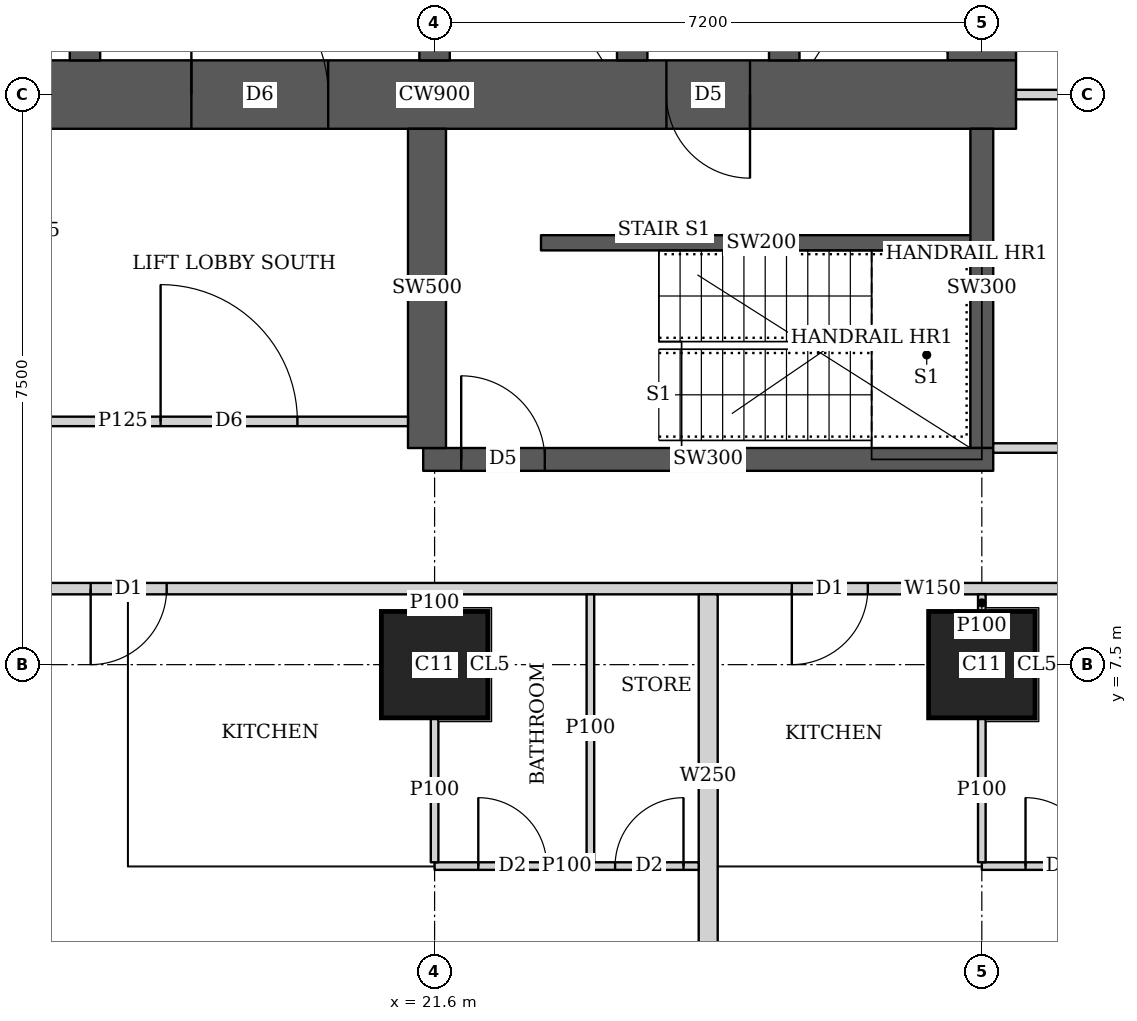
"""IFC4 building model, lengths in metres.
Left out: names, types, materials, properties, quantities, classifications, styles, units other than length and angle.
Written with IfcOpenShell. Run it as: python <this file> out.ifc"""

import sys

from ifc_helpers import new_model, si_unit, direction, frame, frame_2d, origin, origin_2d, place, context, subcontext, project, spatial, rectangle, extrude, element, fill, save


model = new_model("IFC4")
c1 = context("Model", 3, precision=1e-05, world=origin(), true_north=direction((0.0, 1.0)))
c2 = subcontext(c1, "Body", "Model", "MODEL_VIEW")
j1 = project(units=[si_unit("LENGTHUNIT", "METRE"), si_unit("PLANEANGLEUNIT", "RADIAN")], contexts=[c1])
p1 = place(None, origin())
s1 = spatial("IfcSite", under=j1, at=p1, CompositionType="ELEMENT")
p2 = place(p1, origin())
s2 = spatial("IfcBuilding", under=s1, at=p2, CompositionType="ELEMENT")
p3 = place(p2, frame((0.0, 0.0, 223.7)))
s3 = spatial("IfcBuildingStorey", under=s2, at=p3, CompositionType="ELEMENT", Elevation=223.7)
for number, where, z_axis, x_axis in (
    (1, (21.6, 7.5, 0.0), (0.0, 0.0, 1.0), (1.0, 0.0, 0.0)),
    (2, (28.8, 7.5, 0.0), (0.0, 0.0, 1.0), (1.0, 0.0, 0.0)),
):
    element("IfcColumn", number, at=place(p3, frame(where, z_axis=z_axis, x_axis=x_axis)), inside=s3, PredefinedType="COLUMN", context=c2, shape_type="SweptSolid", body=[
        extrude(rectangle(XDim=1.4, YDim=1.4, at=origin_2d()), origin(), (0.0, 0.0, 1.0), 3.75),
    ])
p4 = place(p3, frame((13.95, 15.0, 0.0), z_axis=(0.0, 0.0, 1.0), x_axis=(1.0, 0.0, 0.0)))
e3 = element("IfcWall", 3, at=p4, inside=s3, PredefinedType="SHEAR", context=c2, shape_type="SweptSolid", body=[
    extrude(rectangle(XDim=15.3, YDim=0.9, at=frame_2d((7.65, 0.0))), origin(), (0.0, 0.0, 1.0), 3.75),
])
p5 = place(p4, frame((4.45, 0.0, 0.0)))
e4 = element("IfcOpeningElement", 4, at=p5, cuts=e3, PredefinedType="OPENING", context=c2, shape_type="SweptSolid", body=[
    extrude(rectangle(XDim=1.8, YDim=2.1, at=frame_2d((0.9, 1.05))), frame((0.0, 0.46, 0.0), z_axis=(0.0, -1.0, 0.0), x_axis=(1.0, 0.0, 0.0)), (0.0, 0.0, 1.0), 0.92),
])
p6 = place(p4, frame((10.7, 0.0, 0.0)))
e5 = element("IfcOpeningElement", 5, at=p6, cuts=e3, PredefinedType="OPENING", context=c2, shape_type="SweptSolid", body=[
    extrude(rectangle(XDim=1.1, YDim=2.1, at=frame_2d((0.55, 1.05))), frame((0.0, 0.46, 0.0), z_axis=(0.0, -1.0, 0.0), x_axis=(1.0, 0.0, 0.0)), (0.0, 0.0, 1.0), 0.92),
])
p7 = place(p3, frame((28.8, 15.45, 0.0), z_axis=(0.0, 0.0, 1.0), x_axis=(0.0, 1.0, 0.0)))
e6 = element("IfcWall", 6, at=p7, inside=s3, PredefinedType="SHEAR", context=c2, shape_type="SweptSolid", body=[
    extrude(rectangle(XDim=14.1, YDim=0.9, at=frame_2d((7.05, 0.0))), origin(), (0.0, 0.0, 1.0), 3.75),
])
p8 = place(p3, frame((17.0, 15.45, 0.0), z_axis=(0.0, 0.0, 1.0), x_axis=(0.0, 1.0, 0.0)))
e7 = element("IfcWall", 7, at=p8, inside=s3, PredefinedType="SHEAR", context=c2, shape_type="SweptSolid", body=[
    extrude(rectangle(XDim=14.1, YDim=0.4, at=frame_2d((7.05, 0.0))), origin(), (0.0, 0.0, 1.0), 3.75),
])
p9 = place(p8, frame((1.05, 0.0, 0.0)))
e8 = element("IfcOpeningElement", 8, at=p9, cuts=e7, PredefinedType="OPENING", context=c2, shape_type="SweptSolid", body=[
    extrude(rectangle(XDim=1.0, YDim=2.1, at=frame_2d((0.5, 1.05))), frame((0.0, 0.21, 0.0), z_axis=(0.0, -1.0, 0.0), x_axis=(1.0, 0.0, 0.0)), (0.0, 0.0, 1.0), 0.42),
])
p10 = place(p8, frame((4.675, 0.0, 0.0)))
e9 = element("IfcOpeningElement", 9, at=p10, cuts=e7, PredefinedType="OPENING", context=c2, shape_type="SweptSolid", body=[
    extrude(rectangle(XDim=1.0, YDim=2.1, at=frame_2d((0.5, 1.05))), frame((0.0, 0.21, 0.0), z_axis=(0.0, -1.0, 0.0), x_axis=(1.0, 0.0, 0.0)), (0.0, 0.0, 1.0), 0.42),
])
p11 = place(p8, frame((8.425, 0.0, 0.0)))
e10 = element("IfcOpeningElement", 10, at=p11, cuts=e7, PredefinedType="OPENING", context=c2, shape_type="SweptSolid", body=[
    extrude(rectangle(XDim=1.0, YDim=2.1, at=frame_2d((0.5, 1.05))), frame((0.0, 0.21, 0.0), z_axis=(0.0, -1.0, 0.0), x_axis=(1.0, 0.0, 0.0)), (0.0, 0.0, 1.0), 0.42),
])
p12 = place(p8, frame((12.175, 0.0, 0.0)))
e11 = element("IfcOpeningElement", 11, at=p12, cuts=e7, PredefinedType="OPENING", context=c2, shape_type="SweptSolid", body=[
    extrude(rectangle(XDim=1.0, YDim=2.1, at=frame_2d((0.5, 1.05))), frame((0.0, 0.21, 0.0), z_axis=(0.0, -1.0, 0.0), x_axis=(1.0, 0.0, 0.0)), (0.0, 0.0, 1.0), 0.42),
])
p13 = place(p3, frame((21.6, 15.45, 0.0), z_axis=(0.0, 0.0, 1.0), x_axis=(0.0, 1.0, 0.0)))
e12 = element("IfcWall", 12, at=p13, inside=s3, PredefinedType="SHEAR", context=c2, shape_type="SweptSolid", body=[
    extrude(rectangle(XDim=14.1, YDim=0.4, at=frame_2d((7.05, 0.0))), origin(), (0.0, 0.0, 1.0), 3.75),
])
p14 = place(p13, frame((0.875, 0.0, 0.0)))
e13 = element("IfcOpeningElement", 13, at=p14, cuts=e12, PredefinedType="OPENING", context=c2, shape_type="SweptSolid", body=[
    extrude(rectangle(XDim=1.1, YDim=2.1, at=frame_2d((0.55, 1.05))), frame((0.0, 0.21, 0.0), z_axis=(0.0, -1.0, 0.0), x_axis=(1.0, 0.0, 0.0)), (0.0, 0.0, 1.0), 0.42),
])
p15 = place(p13, frame((4.625, 0.0, 0.0)))
e14 = element("IfcOpeningElement", 14, at=p15, cuts=e12, PredefinedType="OPENING", context=c2, shape_type="SweptSolid", body=[
    extrude(rectangle(XDim=1.1, YDim=2.1, at=frame_2d((0.55, 1.05))), frame((0.0, 0.21, 0.0), z_axis=(0.0, -1.0, 0.0), x_axis=(1.0, 0.0, 0.0)), (0.0, 0.0, 1.0), 0.42),
])
p16 = place(p13, frame((8.375, 0.0, 0.0)))
e15 = element("IfcOpeningElement", 15, at=p16, cuts=e12, PredefinedType="OPENING", context=c2, shape_type="SweptSolid", body=[
    extrude(rectangle(XDim=1.1, YDim=2.1, at=frame_2d((0.55, 1.05))), frame((0.0, 0.21, 0.0), z_axis=(0.0, -1.0, 0.0), x_axis=(1.0, 0.0, 0.0)), (0.0, 0.0, 1.0), 0.42),
])
p17 = place(p13, frame((12.125, 0.0, 0.0)))
e16 = element("IfcOpeningElement", 16, at=p17, cuts=e12, PredefinedType="OPENING", context=c2, shape_type="SweptSolid", body=[
    extrude(rectangle(XDim=1.1, YDim=2.1, at=frame_2d((0.55, 1.05))), frame((0.0, 0.21, 0.0), z_axis=(0.0, -1.0, 0.0), x_axis=(1.0, 0.0, 0.0)), (0.0, 0.0, 1.0), 0.42),
])
p18 = place(p3, frame((24.2, 15.45, 0.0), z_axis=(0.0, 0.0, 1.0), x_axis=(0.0, 1.0, 0.0)))
e17 = element("IfcWall", 17, at=p18, inside=s3, PredefinedType="SHEAR", context=c2, shape_type="SweptSolid", body=[
    extrude(rectangle(XDim=14.1, YDim=0.4, at=frame_2d((7.05, 0.0))), origin(), (0.0, 0.0, 1.0), 3.75),
])
p19 = place(p3, frame((26.2, 15.45, 0.0), z_axis=(0.0, 0.0, 1.0), x_axis=(0.0, 1.0, 0.0)))
e18 = element("IfcWall", 18, at=p19, inside=s3, PredefinedType="SHEAR", context=c2, shape_type="SweptSolid", body=[
    extrude(rectangle(XDim=3.1, YDim=0.4, at=frame_2d((1.55, 0.0))), origin(), (0.0, 0.0, 1.0), 3.75),
])
p20 = place(p19, frame((0.825, 0.0, 0.0)))
e19 = element("IfcOpeningElement", 19, at=p20, cuts=e18, PredefinedType="OPENING", context=c2, shape_type="SweptSolid", body=[
    extrude(rectangle(XDim=1.2, YDim=2.1, at=frame_2d((0.6, 1.05))), frame((0.0, 0.21, 0.0), z_axis=(0.0, -1.0, 0.0), x_axis=(1.0, 0.0, 0.0)), (0.0, 0.0, 1.0), 0.42),
])
p21 = place(p3, frame((21.45, 10.2, 0.0), z_axis=(0.0, 0.0, 1.0), x_axis=(1.0, 0.0, 0.0)))
e20 = element("IfcWall", 20, at=p21, inside=s3, PredefinedType="SHEAR", context=c2, shape_type="SweptSolid", body=[
    extrude(rectangle(XDim=7.5, YDim=0.3, at=frame_2d((3.75, 0.0))), origin(), (0.0, 0.0, 1.0), 3.75),
])
p22 = place(p21, frame((0.5, 0.0, 0.0)))
e21 = element("IfcOpeningElement", 21, at=p22, cuts=e20, PredefinedType="OPENING", context=c2, shape_type="SweptSolid", body=[
    extrude(rectangle(XDim=1.1, YDim=2.1, at=frame_2d((0.55, 1.05))), frame((0.0, 0.16, 0.0), z_axis=(0.0, -1.0, 0.0), x_axis=(1.0, 0.0, 0.0)), (0.0, 0.0, 1.0), 0.32),
])
p23 = place(p3, frame((21.5, 10.35, 0.0), z_axis=(0.0, 0.0, 1.0), x_axis=(0.0, 1.0, 0.0)))
e22 = element("IfcWall", 22, at=p23, inside=s3, PredefinedType="SHEAR", context=c2, shape_type="SweptSolid", body=[
    extrude(rectangle(XDim=4.2, YDim=0.5, at=frame_2d((2.1, 0.0))), origin(), (0.0, 0.0, 1.0), 3.75),
])
p24 = place(p3, frame((28.8, 10.35, 0.0), z_axis=(0.0, 0.0, 1.0), x_axis=(0.0, 1.0, 0.0)))
e23 = element("IfcWall", 23, at=p24, inside=s3, PredefinedType="SHEAR", context=c2, shape_type="SweptSolid", body=[
    extrude(rectangle(XDim=4.2, YDim=0.3, at=frame_2d((2.1, 0.0))), origin(), (0.0, 0.0, 1.0), 3.75),
])
p25 = place(p3, frame((40.053, 8.5, 0.0), z_axis=(0.0, 0.0, 1.0), x_axis=(-1.0, 0.0, 0.0)))
e24 = element("IfcWall", 24, at=p25, inside=s3, PredefinedType="SOLIDWALL", context=c2, shape_type="SweptSolid", body=[
    extrude(rectangle(XDim=23.798, YDim=0.15, at=frame_2d((11.899, 0.0))), origin(), (0.0, 0.0, 1.0), 3.5),
])
p26 = place(p25, frame((21.978, 0.0, 0.0)))
e25 = element("IfcOpeningElement", 25, at=p26, cuts=e24, PredefinedType="OPENING", context=c2, shape_type="SweptSolid", body=[
    extrude(rectangle(XDim=1.0, YDim=2.1, at=frame_2d((0.5, 1.05))), frame((0.0, 0.085, 0.0), z_axis=(0.0, -1.0, 0.0), x_axis=(1.0, 0.0, 0.0)), (0.0, 0.0, 1.0), 0.17),
])
p27 = place(p25, frame((12.753, 0.0, 0.0)))
e26 = element("IfcOpeningElement", 26, at=p27, cuts=e24, PredefinedType="OPENING", context=c2, shape_type="SweptSolid", body=[
    extrude(rectangle(XDim=1.0, YDim=2.1, at=frame_2d((0.5, 1.05))), frame((0.0, 0.085, 0.0), z_axis=(0.0, -1.0, 0.0), x_axis=(1.0, 0.0, 0.0)), (0.0, 0.0, 1.0), 0.17),
])
p28 = place(p25, frame((0.15, 0.0, 0.0)))
e27 = element("IfcOpeningElement", 27, at=p28, cuts=e24, PredefinedType="OPENING", context=c2, shape_type="SweptSolid", body=[
    extrude(rectangle(XDim=1.0, YDim=2.1, at=frame_2d((0.5, 1.05))), frame((0.0, 0.085, 0.0), z_axis=(0.0, -1.0, 0.0), x_axis=(1.0, 0.0, 0.0)), (0.0, 0.0, 1.0), 0.17),
])
p29 = place(p3, frame((25.075, 4.85, 0.0), z_axis=(0.0, 0.0, 1.0), x_axis=(-1.0, 0.0, 0.0)))
e28 = element("IfcWall", 28, at=p29, inside=s3, PredefinedType="PARTITIONING", context=c2, shape_type="SweptSolid", body=[
    extrude(rectangle(XDim=3.475, YDim=0.1, at=frame_2d((1.737, 0.0))), origin(), (0.0, 0.0, 1.0), 3.5),
])
p30 = place(p29, frame((2.0, 0.0, 0.0)))
e29 = element("IfcOpeningElement", 29, at=p30, cuts=e28, PredefinedType="OPENING", context=c2, shape_type="SweptSolid", body=[
    extrude(rectangle(XDim=0.9, YDim=2.1, at=frame_2d((0.45, 1.05))), frame((0.0, 0.06, 0.0), z_axis=(0.0, -1.0, 0.0), x_axis=(1.0, 0.0, 0.0)), (0.0, 0.0, 1.0), 0.12),
])
p31 = place(p29, frame((0.2, 0.0, 0.0)))
e30 = element("IfcOpeningElement", 30, at=p31, cuts=e28, PredefinedType="OPENING", context=c2, shape_type="SweptSolid", body=[
    extrude(rectangle(XDim=0.9, YDim=2.1, at=frame_2d((0.45, 1.05))), frame((0.0, 0.06, 0.0), z_axis=(0.0, -1.0, 0.0), x_axis=(1.0, 0.0, 0.0)), (0.0, 0.0, 1.0), 0.12),
])
p32 = place(p3, frame((21.6, 4.9, 0.0), z_axis=(0.0, 0.0, 1.0), x_axis=(0.0, 1.0, 0.0)))
e31 = element("IfcWall", 31, at=p32, inside=s3, PredefinedType="PARTITIONING", context=c2, shape_type="SweptSolid", body=[
    extrude(rectangle(XDim=1.899, YDim=0.1, at=frame_2d((0.95, 0.0))), origin(), (0.0, 0.0, 1.0), 3.5),
])
p33 = place(p3, frame((21.6, 8.201, 0.0), z_axis=(0.0, 0.0, 1.0), x_axis=(0.0, 1.0, 0.0)))
e32 = element("IfcWall", 32, at=p33, inside=s3, PredefinedType="PARTITIONING", context=c2, shape_type="SweptSolid", body=[
    extrude(rectangle(XDim=0.224, YDim=0.1, at=frame_2d((0.112, 0.0))), origin(), (0.0, 0.0, 1.0), 3.5),
])
p34 = place(p3, frame((23.65, 4.9, 0.0), z_axis=(0.0, 0.0, 1.0), x_axis=(0.0, 1.0, 0.0)))
e33 = element("IfcWall", 33, at=p34, inside=s3, PredefinedType="PARTITIONING", context=c2, shape_type="SweptSolid", body=[
    extrude(rectangle(XDim=3.525, YDim=0.1, at=frame_2d((1.763, 0.0))), origin(), (0.0, 0.0, 1.0), 3.5),
])
p35 = place(p3, frame((35.875, 4.85, 0.0), z_axis=(0.0, 0.0, 1.0), x_axis=(-1.0, 0.0, 0.0)))
e34 = element("IfcWall", 34, at=p35, inside=s3, PredefinedType="PARTITIONING", context=c2, shape_type="SweptSolid", body=[
    extrude(rectangle(XDim=7.075, YDim=0.1, at=frame_2d((3.538, 0.0))), origin(), (0.0, 0.0, 1.0), 3.5),
])
p36 = place(p35, frame((5.6, 0.0, 0.0)))
e35 = element("IfcOpeningElement", 35, at=p36, cuts=e34, PredefinedType="OPENING", context=c2, shape_type="SweptSolid", body=[
    extrude(rectangle(XDim=0.9, YDim=2.1, at=frame_2d((0.45, 1.05))), frame((0.0, 0.06, 0.0), z_axis=(0.0, -1.0, 0.0), x_axis=(1.0, 0.0, 0.0)), (0.0, 0.0, 1.0), 0.12),
])
p37 = place(p35, frame((2.225, 0.0, 0.0)))
e36 = element("IfcOpeningElement", 36, at=p37, cuts=e34, PredefinedType="OPENING", context=c2, shape_type="SweptSolid", body=[
    extrude(rectangle(XDim=0.9, YDim=2.1, at=frame_2d((0.45, 1.05))), frame((0.0, 0.06, 0.0), z_axis=(0.0, -1.0, 0.0), x_axis=(1.0, 0.0, 0.0)), (0.0, 0.0, 1.0), 0.12),
])
p38 = place(p35, frame((3.8, 0.0, 0.0)))
e37 = element("IfcOpeningElement", 37, at=p38, cuts=e34, PredefinedType="OPENING", context=c2, shape_type="SweptSolid", body=[
    extrude(rectangle(XDim=0.9, YDim=2.1, at=frame_2d((0.45, 1.05))), frame((0.0, 0.06, 0.0), z_axis=(0.0, -1.0, 0.0), x_axis=(1.0, 0.0, 0.0)), (0.0, 0.0, 1.0), 0.12),
])
p39 = place(p35, frame((0.425, 0.0, 0.0)))
e38 = element("IfcOpeningElement", 38, at=p39, cuts=e34, PredefinedType="OPENING", context=c2, shape_type="SweptSolid", body=[
    extrude(rectangle(XDim=0.9, YDim=2.1, at=frame_2d((0.45, 1.05))), frame((0.0, 0.06, 0.0), z_axis=(0.0, -1.0, 0.0), x_axis=(1.0, 0.0, 0.0)), (0.0, 0.0, 1.0), 0.12),
])
p40 = place(p3, frame((28.8, 4.9, 0.0), z_axis=(0.0, 0.0, 1.0), x_axis=(0.0, 1.0, 0.0)))
e39 = element("IfcWall", 39, at=p40, inside=s3, PredefinedType="PARTITIONING", context=c2, shape_type="SweptSolid", body=[
    extrude(rectangle(XDim=1.899, YDim=0.1, at=frame_2d((0.95, 0.0))), origin(), (0.0, 0.0, 1.0), 3.5),
])
p41 = place(p3, frame((28.8, 8.201, 0.0), z_axis=(0.0, 0.0, 1.0), x_axis=(0.0, 1.0, 0.0)))
e40 = element("IfcWall", 40, at=p41, inside=s3, PredefinedType="PARTITIONING", context=c2, shape_type="SweptSolid", body=[
    extrude(rectangle(XDim=0.224, YDim=0.1, at=frame_2d((0.112, 0.0))), origin(), (0.0, 0.0, 1.0), 3.5),
])
p42 = place(p3, frame((25.2, 3.65, 0.0), z_axis=(0.0, 0.0, 1.0), x_axis=(0.0, 1.0, 0.0)))
e41 = element("IfcWall", 41, at=p42, inside=s3, PredefinedType="SOLIDWALL", context=c2, shape_type="SweptSolid", body=[
    extrude(rectangle(XDim=4.775, YDim=0.25, at=frame_2d((2.388, 0.0))), origin(), (0.0, 0.0, 1.0), 3.5),
])
p43 = place(p3, frame((13.75, 10.7, 0.0), z_axis=(0.0, 0.0, 1.0), x_axis=(1.0, 0.0, 0.0)))
e42 = element("IfcWall", 42, at=p43, inside=s3, PredefinedType="PARTITIONING", context=c2, shape_type="SweptSolid", body=[
    extrude(rectangle(XDim=7.5, YDim=0.125, at=frame_2d((3.75, 0.0))), origin(), (0.0, 0.0, 1.0), 3.5),
])
p44 = place(p43, frame((4.245, 0.0, 0.0)))
e43 = element("IfcOpeningElement", 43, at=p44, cuts=e42, PredefinedType="OPENING", context=c2, shape_type="SweptSolid", body=[
    extrude(rectangle(XDim=1.8, YDim=2.1, at=frame_2d((0.9, 1.05))), frame((0.0, 0.073, 0.0), z_axis=(0.0, -1.0, 0.0), x_axis=(1.0, 0.0, 0.0)), (0.0, 0.0, 1.0), 0.145),
])
p45 = place(p3, frame((28.95, 10.35, 0.0), z_axis=(0.0, 0.0, 1.0), x_axis=(1.0, 0.0, 0.0)))
e44 = element("IfcWall", 44, at=p45, inside=s3, PredefinedType="PARTITIONING", context=c2, shape_type="SweptSolid", body=[
    extrude(rectangle(XDim=8.886, YDim=0.125, at=frame_2d((4.443, 0.0))), origin(), (0.0, 0.0, 1.0), 3.5),
])
p46 = place(p3, frame((29.25, 15.0, 0.0), z_axis=(0.0, 0.0, 1.0), x_axis=(1.0, 0.0, 0.0)))
e45 = element("IfcWall", 45, at=p46, inside=s3, PredefinedType="PARTITIONING", context=c2, shape_type="SweptSolid", body=[
    extrude(rectangle(XDim=6.049, YDim=0.125, at=frame_2d((3.024, 0.0))), origin(), (0.0, 0.0, 1.0), 3.5),
])
p47 = place(p3, frame((23.0, 13.05, 0.0), z_axis=(0.0, 0.0, 1.0), x_axis=(1.0, 0.0, 0.0)))
e46 = element("IfcWall", 46, at=p47, inside=s3, PredefinedType="SHEAR", context=c2, shape_type="SweptSolid", body=[
    extrude(rectangle(XDim=5.8, YDim=0.2, at=frame_2d((2.9, 0.0))), origin(), (0.0, 0.0, 1.0), 3.75),
])
p48 = place(p30, origin())
e47 = element("IfcDoor", 47, at=p48, inside=s3, OperationType="SINGLE_SWING_LEFT", PredefinedType="DOOR", context=c2, shape_type="SweptSolid", body=[
    extrude(rectangle(XDim=0.9, YDim=2.1, at=frame_2d((0.45, 1.05))), frame((0.0, 0.025, 0.0), z_axis=(0.0, -1.0, 0.0), x_axis=(1.0, 0.0, 0.0)), (0.0, 0.0, 1.0), 0.05),
])
fill(e29, e47)
p49 = place(p31, origin())
e48 = element("IfcDoor", 48, at=p49, inside=s3, OperationType="SINGLE_SWING_RIGHT", PredefinedType="DOOR", context=c2, shape_type="SweptSolid", body=[
    extrude(rectangle(XDim=0.9, YDim=2.1, at=frame_2d((0.45, 1.05))), frame((0.0, 0.025, 0.0), z_axis=(0.0, -1.0, 0.0), x_axis=(1.0, 0.0, 0.0)), (0.0, 0.0, 1.0), 0.05),
])
fill(e30, e48)
p50 = place(p26, origin())
e49 = element("IfcDoor", 49, at=p50, inside=s3, OperationType="SINGLE_SWING_RIGHT", PredefinedType="DOOR", context=c2, shape_type="SweptSolid", body=[
    extrude(rectangle(XDim=1.0, YDim=2.1, at=frame_2d((0.5, 1.05))), frame((0.0, 0.025, 0.0), z_axis=(0.0, -1.0, 0.0), x_axis=(1.0, 0.0, 0.0)), (0.0, 0.0, 1.0), 0.05),
])
fill(e25, e49)
p51 = place(p36, origin())
e50 = element("IfcDoor", 50, at=p51, inside=s3, OperationType="SINGLE_SWING_LEFT", PredefinedType="DOOR", context=c2, shape_type="SweptSolid", body=[
    extrude(rectangle(XDim=0.9, YDim=2.1, at=frame_2d((0.45, 1.05))), frame((0.0, 0.025, 0.0), z_axis=(0.0, -1.0, 0.0), x_axis=(1.0, 0.0, 0.0)), (0.0, 0.0, 1.0), 0.05),
])
fill(e35, e50)
p52 = place(p27, origin())
e51 = element("IfcDoor", 51, at=p52, inside=s3, OperationType="SINGLE_SWING_RIGHT", PredefinedType="DOOR", context=c2, shape_type="SweptSolid", body=[
    extrude(rectangle(XDim=1.0, YDim=2.1, at=frame_2d((0.5, 1.05))), frame((0.0, 0.025, 0.0), z_axis=(0.0, -1.0, 0.0), x_axis=(1.0, 0.0, 0.0)), (0.0, 0.0, 1.0), 0.05),
])
fill(e26, e51)
p53 = place(p44, origin())
e52 = element("IfcDoor", 52, at=p53, inside=s3, OperationType="DOUBLE_DOOR_SINGLE_SWING", PredefinedType="DOOR", context=c2, shape_type="SweptSolid", body=[
    extrude(rectangle(XDim=1.8, YDim=2.1, at=frame_2d((0.9, 1.05))), frame((0.0, 0.025, 0.0), z_axis=(0.0, -1.0, 0.0), x_axis=(1.0, 0.0, 0.0)), (0.0, 0.0, 1.0), 0.05),
])
fill(e43, e52)
p54 = place(p5, origin())
e53 = element("IfcDoor", 53, at=p54, inside=s3, OperationType="DOUBLE_DOOR_SINGLE_SWING", PredefinedType="DOOR", context=c2, shape_type="SweptSolid", body=[
    extrude(rectangle(XDim=1.8, YDim=2.1, at=frame_2d((0.9, 1.05))), frame((0.0, 0.025, 0.0), z_axis=(0.0, -1.0, 0.0), x_axis=(1.0, 0.0, 0.0)), (0.0, 0.0, 1.0), 0.05),
])
fill(e4, e53)
p55 = place(p6, origin())
e54 = element("IfcDoor", 54, at=p55, inside=s3, OperationType="SINGLE_SWING_LEFT", PredefinedType="DOOR", context=c2, shape_type="SweptSolid", body=[
    extrude(rectangle(XDim=1.1, YDim=2.1, at=frame_2d((0.55, 1.05))), frame((0.0, 0.025, 0.0), z_axis=(0.0, -1.0, 0.0), x_axis=(1.0, 0.0, 0.0)), (0.0, 0.0, 1.0), 0.05),
])
fill(e5, e54)
p56 = place(p22, origin())
e55 = element("IfcDoor", 55, at=p56, inside=s3, OperationType="SINGLE_SWING_LEFT", PredefinedType="DOOR", context=c2, shape_type="SweptSolid", body=[
    extrude(rectangle(XDim=1.1, YDim=2.1, at=frame_2d((0.55, 1.05))), frame((0.0, 0.025, 0.0), z_axis=(0.0, -1.0, 0.0), x_axis=(1.0, 0.0, 0.0)), (0.0, 0.0, 1.0), 0.05),
])
fill(e21, e55)
save(model, sys.argv[1])
